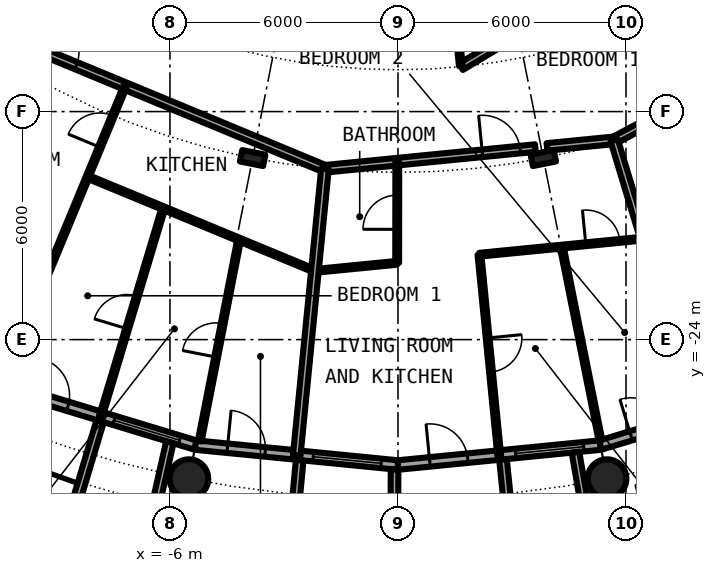
"""IFC4 building model, lengths in metres.
Left out: names, types, materials, properties, quantities, classifications, styles, units other than length and angle.
Written with IfcOpenShell. Run it as: python <this file> out.ifc"""

import sys

from ifc_helpers import new_model, si_unit, direction, frame, frame_2d, origin, origin_2d, place, context, subcontext, project, spatial, rectangle, hollow_circle, i_section, extrude, element, fill, save


model = new_model("IFC4")
c1 = context("Model", 3, precision=1e-05, world=origin(), true_north=direction((0.0, 1.0)))
c2 = subcontext(c1, "Body", "Model", "MODEL_VIEW")
j1 = project(units=[si_unit("LENGTHUNIT", "METRE"), si_unit("PLANEANGLEUNIT", "RADIAN")], contexts=[c1])
p1 = place(None, origin())
s1 = spatial("IfcSite", under=j1, at=p1, CompositionType="ELEMENT")
p2 = place(p1, origin())
s2 = spatial("IfcBuilding", under=s1, at=p2, CompositionType="ELEMENT")
p3 = place(p2, frame((0.0, 0.0, 50.25)))
s3 = spatial("IfcBuildingStorey", under=s2, at=p3, CompositionType="ELEMENT", Elevation=50.25)
for number, where, z_axis, x_axis in (
    (1, (-5.501, -27.658, 0.0), (0.0, 0.0, 1.0), (1.0, 0.0, 0.0)),
    (2, (5.501, -27.658, 0.0), (0.0, 0.0, 1.0), (1.0, 0.0, 0.0)),
):
    element("IfcColumn", number, at=place(p3, frame(where, z_axis=z_axis, x_axis=x_axis)), inside=s3, PredefinedType="COLUMN", context=c2, shape_type="SweptSolid", body=[
        extrude(hollow_circle(Radius=0.508, WallThickness=0.05, at=origin_2d()), origin(), (0.0, 0.0, 1.0), 3.05),
    ])
for number, where, z_axis, x_axis in (
    (3, (-3.824, -19.223, 0.0), (0.0, 0.0, 1.0), (-0.195, -0.981, 0.0)),
    (4, (3.824, -19.223, 0.0), (0.0, 0.0, 1.0), (0.195, -0.981, 0.0)),
):
    element("IfcColumn", number, at=place(p3, frame(where, z_axis=z_axis, x_axis=x_axis)), inside=s3, PredefinedType="COLUMN", context=c2, shape_type="SweptSolid", body=[
        extrude(i_section(OverallWidth=0.305, OverallDepth=0.62, WebThickness=0.021, FlangeThickness=0.04, FilletRadius=0.027, at=origin_2d()), origin(), (0.0, 0.0, 1.0), 3.05),
    ])
p4 = place(p3, frame((-10.447, -25.222, 0.0), z_axis=(0.0, 0.0, 1.0), x_axis=(0.956965678721, -0.290201119486, 0.0)))
e5 = element("IfcWall", 5, at=p4, inside=s3, PredefinedType="SOLIDWALL", context=c2, shape_type="SweptSolid", body=[
    extrude(rectangle(XDim=5.351, YDim=0.25, at=frame_2d((2.676, 0.0))), origin(), (0.0, 0.0, 1.0), 2.7),
])
p5 = place(p4, frame((0.841, 0.0, 0.0)))
e6 = element("IfcOpeningElement", 6, at=p5, cuts=e5, PredefinedType="OPENING", context=c2, shape_type="SweptSolid", body=[
    extrude(rectangle(XDim=1.0, YDim=2.2, at=frame_2d((0.5, 1.1))), frame((0.0, 0.135, 0.0), z_axis=(0.0, -1.0, 0.0), x_axis=(1.0, 0.0, 0.0)), (0.0, 0.0, 1.0), 0.27),
])
p6 = place(p4, frame((3.111, 0.0, 0.3)))
e7 = element("IfcOpeningElement", 7, at=p6, cuts=e5, PredefinedType="OPENING", context=c2, shape_type="SweptSolid", body=[
    extrude(rectangle(XDim=1.8, YDim=2.1, at=frame_2d((0.9, 1.05))), frame((0.0, 0.135, 0.0), z_axis=(0.0, -1.0, 0.0), x_axis=(1.0, 0.0, 0.0)), (0.0, 0.0, 1.0), 0.27),
])
p7 = place(p3, frame((-7.837, -26.144, -0.03), z_axis=(0.0, 0.0, 1.0), x_axis=(-0.287064767992, -0.957911174889, 0.0)))
e8 = element("IfcWall", 8, at=p7, inside=s3, PredefinedType="SOLIDWALL", context=c2, shape_type="SweptSolid", body=[
    extrude(rectangle(XDim=3.006, YDim=0.2, at=frame_2d((1.503, 0.0))), origin(), (0.0, 0.0, 1.0), 2.73),
])
p8 = place(p3, frame((-6.004, -26.7, -0.03), z_axis=(0.0, 0.0, 1.0), x_axis=(-0.219609259383, -0.975587911566, 0.0)))
e9 = element("IfcWall", 9, at=p8, inside=s3, PredefinedType="SOLIDWALL", context=c2, shape_type="SweptSolid", body=[
    extrude(rectangle(XDim=2.933, YDim=0.2, at=frame_2d((1.466, 0.0))), origin(), (0.0, 0.0, 1.0), 2.73),
])
p9 = place(p3, frame((-5.326, -26.775, 0.0), z_axis=(0.0, 0.0, 1.0), x_axis=(0.995173996315, -0.098126026407, 0.0)))
e10 = element("IfcWall", 10, at=p9, inside=s3, PredefinedType="SOLIDWALL", context=c2, shape_type="SweptSolid", body=[
    extrude(rectangle(XDim=5.352, YDim=0.25, at=frame_2d((2.676, 0.0))), origin(), (0.0, 0.0, 1.0), 2.7),
])
p10 = place(p9, frame((0.841, 0.0, 0.0)))
e11 = element("IfcOpeningElement", 11, at=p10, cuts=e10, PredefinedType="OPENING", context=c2, shape_type="SweptSolid", body=[
    extrude(rectangle(XDim=1.0, YDim=2.2, at=frame_2d((0.5, 1.1))), frame((0.0, 0.135, 0.0), z_axis=(0.0, -1.0, 0.0), x_axis=(1.0, 0.0, 0.0)), (0.0, 0.0, 1.0), 0.27),
])
p11 = place(p9, frame((3.111, 0.0, 0.3)))
e12 = element("IfcOpeningElement", 12, at=p11, cuts=e10, PredefinedType="OPENING", context=c2, shape_type="SweptSolid", body=[
    extrude(rectangle(XDim=1.8, YDim=2.1, at=frame_2d((0.9, 1.05))), frame((0.0, 0.135, 0.0), z_axis=(0.0, -1.0, 0.0), x_axis=(1.0, 0.0, 0.0)), (0.0, 0.0, 1.0), 0.27),
])
p12 = place(p3, frame((-2.586, -27.171, -0.03), z_axis=(0.0, 0.0, 1.0), x_axis=(-0.094548432284, -0.995520262954, 0.0)))
e13 = element("IfcWall", 13, at=p12, inside=s3, PredefinedType="SOLIDWALL", context=c2, shape_type="SweptSolid", body=[
    extrude(rectangle(XDim=3.006, YDim=0.2, at=frame_2d((1.503, 0.0))), origin(), (0.0, 0.0, 1.0), 2.73),
])
p13 = place(p3, frame((-0.09, -27.417, -0.03), z_axis=(0.0, 0.0, 1.0), x_axis=(-0.00347308367, -0.999993968827, 0.0)))
e14 = element("IfcWall", 14, at=p13, inside=s3, PredefinedType="SOLIDWALL", context=c2, shape_type="SweptSolid", body=[
    extrude(rectangle(XDim=2.882, YDim=0.2, at=frame_2d((1.441, 0.0))), origin(), (0.0, 0.0, 1.0), 2.73),
])
p14 = place(p3, frame((0.0, -27.3, 0.0), z_axis=(0.0, 0.0, 1.0), x_axis=(0.995173996315, 0.098126026407, 0.0)))
e15 = element("IfcWall", 15, at=p14, inside=s3, PredefinedType="SOLIDWALL", context=c2, shape_type="SweptSolid", body=[
    extrude(rectangle(XDim=5.352, YDim=0.25, at=frame_2d((2.676, 0.0))), origin(), (0.0, 0.0, 1.0), 2.7),
])
p15 = place(p14, frame((0.841, 0.0, 0.0)))
e16 = element("IfcOpeningElement", 16, at=p15, cuts=e15, PredefinedType="OPENING", context=c2, shape_type="SweptSolid", body=[
    extrude(rectangle(XDim=1.0, YDim=2.2, at=frame_2d((0.5, 1.1))), frame((0.0, 0.135, 0.0), z_axis=(0.0, -1.0, 0.0), x_axis=(1.0, 0.0, 0.0)), (0.0, 0.0, 1.0), 0.27),
])
p16 = place(p14, frame((3.111, 0.0, 0.3)))
e17 = element("IfcOpeningElement", 17, at=p16, cuts=e15, PredefinedType="OPENING", context=c2, shape_type="SweptSolid", body=[
    extrude(rectangle(XDim=1.8, YDim=2.1, at=frame_2d((0.9, 1.05))), frame((0.0, 0.135, 0.0), z_axis=(0.0, -1.0, 0.0), x_axis=(1.0, 0.0, 0.0)), (0.0, 0.0, 1.0), 0.27),
])
p17 = place(p3, frame((2.764, -27.153, -0.03), z_axis=(0.0, 0.0, 1.0), x_axis=(0.101505487237, -0.994834979311, 0.0)))
e18 = element("IfcWall", 18, at=p17, inside=s3, PredefinedType="SOLIDWALL", context=c2, shape_type="SweptSolid", body=[
    extrude(rectangle(XDim=3.007, YDim=0.2, at=frame_2d((1.503, 0.0))), origin(), (0.0, 0.0, 1.0), 2.73),
])
p18 = place(p3, frame((4.671, -26.966, -0.03), z_axis=(0.0, 0.0, 1.0), x_axis=(0.170539878907, -0.985350774954, 0.0)))
e19 = element("IfcWall", 19, at=p18, inside=s3, PredefinedType="SOLIDWALL", context=c2, shape_type="SweptSolid", body=[
    extrude(rectangle(XDim=2.932, YDim=0.2, at=frame_2d((1.466, 0.0))), origin(), (0.0, 0.0, 1.0), 2.73),
])
p19 = place(p3, frame((5.326, -26.775, 0.0), z_axis=(0.0, 0.0, 1.0), x_axis=(0.956965678721, 0.290201119486, 0.0)))
e20 = element("IfcWall", 20, at=p19, inside=s3, PredefinedType="SOLIDWALL", context=c2, shape_type="SweptSolid", body=[
    extrude(rectangle(XDim=5.351, YDim=0.25, at=frame_2d((2.676, 0.0))), origin(), (0.0, 0.0, 1.0), 2.7),
])
p20 = place(p19, frame((0.841, 0.0, 0.0)))
e21 = element("IfcOpeningElement", 21, at=p20, cuts=e20, PredefinedType="OPENING", context=c2, shape_type="SweptSolid", body=[
    extrude(rectangle(XDim=1.0, YDim=2.2, at=frame_2d((0.5, 1.1))), frame((0.0, 0.135, 0.0), z_axis=(0.0, -1.0, 0.0), x_axis=(1.0, 0.0, 0.0)), (0.0, 0.0, 1.0), 0.27),
])
p21 = place(p19, frame((3.111, 0.0, 0.3)))
e22 = element("IfcOpeningElement", 22, at=p21, cuts=e20, PredefinedType="OPENING", context=c2, shape_type="SweptSolid", body=[
    extrude(rectangle(XDim=1.8, YDim=2.1, at=frame_2d((0.9, 1.05))), frame((0.0, 0.135, 0.0), z_axis=(0.0, -1.0, 0.0), x_axis=(1.0, 0.0, 0.0)), (0.0, 0.0, 1.0), 0.27),
])
p22 = place(p3, frame((-2.196, -22.193, 0.0), z_axis=(0.0, 0.0, 1.0), x_axis=(0.995193648169, 0.097926516552, 0.0)))
e23 = element("IfcWall", 23, at=p22, inside=s3, PredefinedType="PARTITIONING", context=c2, shape_type="SweptSolid", body=[
    extrude(rectangle(XDim=2.177, YDim=0.1, at=frame_2d((1.088, 0.0))), origin(), (0.0, 0.0, 1.0), 2.7),
])
p23 = place(p3, frame((2.144, -21.766, 0.0), z_axis=(0.0, 0.0, 1.0), x_axis=(0.995192120883, 0.097942036599, 0.0)))
e24 = element("IfcWall", 24, at=p23, inside=s3, PredefinedType="PARTITIONING", context=c2, shape_type="SweptSolid", body=[
    extrude(rectangle(XDim=4.35, YDim=0.1, at=frame_2d((2.175, 0.0))), origin(), (0.0, 0.0, 1.0), 2.7),
])
p24 = place(p23, frame((2.812, 0.0, 0.0)))
e25 = element("IfcOpeningElement", 25, at=p24, cuts=e24, PredefinedType="OPENING", context=c2, shape_type="SweptSolid", body=[
    extrude(rectangle(XDim=0.9, YDim=2.3, at=frame_2d((0.45, 1.15))), frame((0.0, 0.06, 0.0), z_axis=(0.0, -1.0, 0.0), x_axis=(1.0, 0.0, 0.0)), (0.0, 0.0, 1.0), 0.12),
])
p25 = place(p3, frame((-8.164, -19.716, 0.0), z_axis=(0.0, 0.0, 1.0), x_axis=(0.92387253274, -0.38270033087, 0.0)))
e26 = element("IfcWall", 26, at=p25, inside=s3, PredefinedType="PARTITIONING", context=c2, shape_type="SweptSolid", body=[
    extrude(rectangle(XDim=6.475, YDim=0.1, at=frame_2d((3.238, 0.0))), origin(), (0.0, 0.0, 1.0), 2.7),
])
p26 = place(p3, frame((-1.927, -19.506, 0.0), z_axis=(0.0, 0.0, 1.0), x_axis=(0.995181086618, 0.098054091383, 0.0)))
e27 = element("IfcWall", 27, at=p26, inside=s3, PredefinedType="PARTITIONING", context=c2, shape_type="SweptSolid", body=[
    extrude(rectangle(XDim=5.57, YDim=0.2, at=frame_2d((2.785, 0.0))), origin(), (0.0, 0.0, 1.0), 2.38),
])
p27 = place(p26, frame((4.168, 0.0, 0.0)))
e28 = element("IfcOpeningElement", 28, at=p27, cuts=e27, PredefinedType="OPENING", context=c2, shape_type="SweptSolid", body=[
    extrude(rectangle(XDim=1.0, YDim=2.3, at=frame_2d((0.5, 1.15))), frame((0.0, 0.11, 0.0), z_axis=(0.0, -1.0, 0.0), x_axis=(1.0, 0.0, 0.0)), (0.0, 0.0, 1.0), 0.22),
])
p28 = place(p3, frame((3.921, -18.93, 0.0), z_axis=(0.0, 0.0, 1.0), x_axis=(0.995207057161, 0.097790149696, 0.0)))
e29 = element("IfcWall", 29, at=p28, inside=s3, PredefinedType="PARTITIONING", context=c2, shape_type="SweptSolid", body=[
    extrude(rectangle(XDim=1.778, YDim=0.2, at=frame_2d((0.889, 0.0))), origin(), (0.0, 0.0, 1.0), 2.38),
])
p29 = place(p3, frame((5.69, -18.756, 0.0), z_axis=(0.0, 0.0, 1.0), x_axis=(0.881866548297, 0.471499089072, 0.0)))
e30 = element("IfcWall", 30, at=p29, inside=s3, PredefinedType="PARTITIONING", context=c2, shape_type="SweptSolid", body=[
    extrude(rectangle(XDim=5.563, YDim=0.2, at=frame_2d((2.782, 0.0))), origin(), (0.0, 0.0, 1.0), 2.38),
])
p30 = place(p29, frame((2.368, 0.0, 0.0)))
e31 = element("IfcOpeningElement", 31, at=p30, cuts=e30, PredefinedType="OPENING", context=c2, shape_type="SweptSolid", body=[
    extrude(rectangle(XDim=1.0, YDim=2.3, at=frame_2d((0.5, 1.15))), frame((0.0, 0.11, 0.0), z_axis=(0.0, -1.0, 0.0), x_axis=(1.0, 0.0, 0.0)), (0.0, 0.0, 1.0), 0.22),
])
p31 = place(p3, frame((-12.434, -15.151, 0.0), z_axis=(0.0, 0.0, 1.0), x_axis=(0.923888467236, -0.382661861319, 0.0)))
e32 = element("IfcWall", 32, at=p31, inside=s3, PredefinedType="PARTITIONING", context=c2, shape_type="SweptSolid", body=[
    extrude(rectangle(XDim=11.381, YDim=0.2, at=frame_2d((5.691, 0.0))), origin(), (0.0, 0.0, 1.0), 2.7),
])
p32 = place(p31, frame((3.292, 0.0, 0.0)))
e33 = element("IfcOpeningElement", 33, at=p32, cuts=e32, PredefinedType="OPENING", context=c2, shape_type="SweptSolid", body=[
    extrude(rectangle(XDim=1.0, YDim=2.3, at=frame_2d((0.5, 1.15))), frame((0.0, 0.11, 0.0), z_axis=(0.0, -1.0, 0.0), x_axis=(1.0, 0.0, 0.0)), (0.0, 0.0, 1.0), 0.22),
])
p33 = place(p3, frame((1.656, -16.819, 0.0), z_axis=(0.0, 0.0, 1.0), x_axis=(0.857773470126, 0.514027892189, 0.0)))
e34 = element("IfcWall", 34, at=p33, inside=s3, PredefinedType="PARTITIONING", context=c2, shape_type="SweptSolid", body=[
    extrude(rectangle(XDim=14.429, YDim=0.2, at=frame_2d((7.215, 0.0))), origin(), (0.0, 0.0, 1.0), 2.7),
])
p34 = place(p33, frame((4.318, 0.0, 0.0)))
e35 = element("IfcOpeningElement", 35, at=p34, cuts=e34, PredefinedType="OPENING", context=c2, shape_type="SweptSolid", body=[
    extrude(rectangle(XDim=1.0, YDim=2.3, at=frame_2d((0.5, 1.15))), frame((0.0, 0.11, 0.0), z_axis=(0.0, -1.0, 0.0), x_axis=(1.0, 0.0, 0.0)), (0.0, 0.0, 1.0), 0.22),
])
p35 = place(p3, frame((-10.399, -25.106, 0.0), z_axis=(0.0, 0.0, 1.0), x_axis=(0.382697543868, 0.923873687209, 0.0)))
e36 = element("IfcWall", 36, at=p35, inside=s3, PredefinedType="PARTITIONING", context=c2, shape_type="SweptSolid", body=[
    extrude(rectangle(XDim=8.419, YDim=0.1, at=frame_2d((4.209, 0.0))), origin(), (0.0, 0.0, 1.0), 2.7),
])
p36 = place(p35, frame((6.677, 0.0, 0.0)))
e37 = element("IfcOpeningElement", 37, at=p36, cuts=e36, PredefinedType="OPENING", context=c2, shape_type="SweptSolid", body=[
    extrude(rectangle(XDim=0.9, YDim=2.3, at=frame_2d((0.45, 1.15))), frame((0.0, 0.06, 0.0), z_axis=(0.0, -1.0, 0.0), x_axis=(1.0, 0.0, 0.0)), (0.0, 0.0, 1.0), 0.12),
])
p37 = place(p35, frame((2.468, 0.0, 0.0)))
e38 = element("IfcOpeningElement", 38, at=p37, cuts=e36, PredefinedType="OPENING", context=c2, shape_type="SweptSolid", body=[
    extrude(rectangle(XDim=0.9, YDim=2.3, at=frame_2d((0.45, 1.15))), frame((0.0, 0.06, 0.0), z_axis=(0.0, -1.0, 0.0), x_axis=(1.0, 0.0, 0.0)), (0.0, 0.0, 1.0), 0.12),
])
p38 = place(p3, frame((-7.821, -26.025, 0.0), z_axis=(0.0, 0.0, 1.0), x_axis=(0.287793773423, 0.957692405723, 0.0)))
e39 = element("IfcWall", 39, at=p38, inside=s3, PredefinedType="PARTITIONING", context=c2, shape_type="SweptSolid", body=[
    extrude(rectangle(XDim=5.726, YDim=0.1, at=frame_2d((2.863, 0.0))), origin(), (0.0, 0.0, 1.0), 2.7),
])
p39 = place(p38, frame((2.413, 0.0, 0.0)))
e40 = element("IfcOpeningElement", 40, at=p39, cuts=e39, PredefinedType="OPENING", context=c2, shape_type="SweptSolid", body=[
    extrude(rectangle(XDim=0.9, YDim=2.3, at=frame_2d((0.45, 1.15))), frame((0.0, 0.06, 0.0), z_axis=(0.0, -1.0, 0.0), x_axis=(1.0, 0.0, 0.0)), (0.0, 0.0, 1.0), 0.12),
])
p40 = place(p3, frame((-5.217, -26.67, 0.0), z_axis=(0.0, 0.0, 1.0), x_axis=(0.192109041462, 0.981373586453, 0.0)))
e41 = element("IfcWall", 41, at=p40, inside=s3, PredefinedType="PARTITIONING", context=c2, shape_type="SweptSolid", body=[
    extrude(rectangle(XDim=5.404, YDim=0.1, at=frame_2d((2.702, 0.0))), origin(), (0.0, 0.0, 1.0), 2.7),
])
p41 = place(p40, frame((2.252, 0.0, 0.0)))
e42 = element("IfcOpeningElement", 42, at=p41, cuts=e41, PredefinedType="OPENING", context=c2, shape_type="SweptSolid", body=[
    extrude(rectangle(XDim=0.9, YDim=2.3, at=frame_2d((0.45, 1.15))), frame((0.0, 0.06, 0.0), z_axis=(0.0, -1.0, 0.0), x_axis=(1.0, 0.0, 0.0)), (0.0, 0.0, 1.0), 0.12),
])
p42 = place(p3, frame((-2.664, -27.044, 0.0), z_axis=(0.0, 0.0, 1.0), x_axis=(0.098115395479, 0.995175044487, 0.0)))
e43 = element("IfcWall", 43, at=p42, inside=s3, PredefinedType="PARTITIONING", context=c2, shape_type="SweptSolid", body=[
    extrude(rectangle(XDim=7.574, YDim=0.2, at=frame_2d((3.787, 0.0))), origin(), (0.0, 0.0, 1.0), 2.7),
])
p43 = place(p3, frame((-0.021, -21.979, 0.0), z_axis=(0.0, 0.0, 1.0), x_axis=(0.001101017775, 0.99999939388, 0.0)))
e44 = element("IfcWall", 44, at=p43, inside=s3, PredefinedType="PARTITIONING", context=c2, shape_type="SweptSolid", body=[
    extrude(rectangle(XDim=2.661, YDim=0.1, at=frame_2d((1.331, 0.0))), origin(), (0.0, 0.0, 1.0), 2.7),
])
p44 = place(p43, frame((0.881, 0.0, 0.0)))
e45 = element("IfcOpeningElement", 45, at=p44, cuts=e44, PredefinedType="OPENING", context=c2, shape_type="SweptSolid", body=[
    extrude(rectangle(XDim=0.9, YDim=2.3, at=frame_2d((0.45, 1.15))), frame((0.0, 0.06, 0.0), z_axis=(0.0, -1.0, 0.0), x_axis=(1.0, 0.0, 0.0)), (0.0, 0.0, 1.0), 0.12),
])
p45 = place(p3, frame((2.144, -21.766, 0.0), z_axis=(0.0, 0.0, 1.0), x_axis=(0.098054199821, -0.995181075934, 0.0)))
e46 = element("IfcWall", 46, at=p45, inside=s3, PredefinedType="PARTITIONING", context=c2, shape_type="SweptSolid", body=[
    extrude(rectangle(XDim=5.303, YDim=0.1, at=frame_2d((2.652, 0.0))), origin(), (0.0, 0.0, 1.0), 2.7),
])
p46 = place(p45, frame((2.202, 0.0, 0.0)))
e47 = element("IfcOpeningElement", 47, at=p46, cuts=e46, PredefinedType="OPENING", context=c2, shape_type="SweptSolid", body=[
    extrude(rectangle(XDim=0.9, YDim=2.3, at=frame_2d((0.45, 1.15))), frame((0.0, 0.06, 0.0), z_axis=(0.0, -1.0, 0.0), x_axis=(1.0, 0.0, 0.0)), (0.0, 0.0, 1.0), 0.12),
])
p47 = place(p3, frame((4.309, -21.553, 0.0), z_axis=(0.0, 0.0, 1.0), x_axis=(0.195899255693, -0.980624026638, 0.0)))
e48 = element("IfcWall", 48, at=p47, inside=s3, PredefinedType="PARTITIONING", context=c2, shape_type="SweptSolid", body=[
    extrude(rectangle(XDim=5.196, YDim=0.1, at=frame_2d((2.598, 0.0))), origin(), (0.0, 0.0, 1.0), 2.7),
])
p48 = place(p3, frame((5.689, -18.756, 0.0), z_axis=(0.0, 0.0, 1.0), x_axis=(0.290294523619, -0.956937348815, 0.0)))
e49 = element("IfcWall", 49, at=p48, inside=s3, PredefinedType="PARTITIONING", context=c2, shape_type="SweptSolid", body=[
    extrude(rectangle(XDim=7.575, YDim=0.2, at=frame_2d((3.788, 0.0))), origin(), (0.0, 0.0, 1.0), 2.7),
])
p49 = place(p3, frame((1.654, -16.797, 0.0), z_axis=(0.0, 0.0, 1.0), x_axis=(-0.097901702875, 0.995196089509, 0.0)))
e50 = element("IfcWall", 50, at=p49, inside=s3, PredefinedType="PARTITIONING", context=c2, shape_type="SweptSolid", body=[
    extrude(rectangle(XDim=2.656, YDim=0.1, at=frame_2d((1.328, 0.0))), origin(), (0.0, 0.0, 1.0), 2.7),
])
p50 = place(p5, origin())
e51 = element("IfcDoor", 51, at=p50, inside=s3, OperationType="SINGLE_SWING_LEFT", PredefinedType="DOOR", context=c2, shape_type="SweptSolid", body=[
    extrude(rectangle(XDim=1.0, YDim=2.2, at=frame_2d((0.5, 1.1))), frame((0.0, 0.025, 0.0), z_axis=(0.0, -1.0, 0.0), x_axis=(1.0, 0.0, 0.0)), (0.0, 0.0, 1.0), 0.05),
])
fill(e6, e51)
p51 = place(p6, origin())
e52 = element("IfcWindow", 52, at=p51, inside=s3, PartitioningType="SINGLE_PANEL", PredefinedType="WINDOW", context=c2, shape_type="SweptSolid", body=[
    extrude(rectangle(XDim=1.8, YDim=2.1, at=frame_2d((0.9, 1.05))), frame((0.0, 0.03, 0.0), z_axis=(0.0, -1.0, 0.0), x_axis=(1.0, 0.0, 0.0)), (0.0, 0.0, 1.0), 0.06),
])
fill(e7, e52)
p52 = place(p10, origin())
e53 = element("IfcDoor", 53, at=p52, inside=s3, OperationType="SINGLE_SWING_LEFT", PredefinedType="DOOR", context=c2, shape_type="SweptSolid", body=[
    extrude(rectangle(XDim=1.0, YDim=2.2, at=frame_2d((0.5, 1.1))), frame((0.0, 0.025, 0.0), z_axis=(0.0, -1.0, 0.0), x_axis=(1.0, 0.0, 0.0)), (0.0, 0.0, 1.0), 0.05),
])
fill(e11, e53)
p53 = place(p11, origin())
e54 = element("IfcWindow", 54, at=p53, inside=s3, PartitioningType="SINGLE_PANEL", PredefinedType="WINDOW", context=c2, shape_type="SweptSolid", body=[
    extrude(rectangle(XDim=1.8, YDim=2.1, at=frame_2d((0.9, 1.05))), frame((0.0, 0.03, 0.0), z_axis=(0.0, -1.0, 0.0), x_axis=(1.0, 0.0, 0.0)), (0.0, 0.0, 1.0), 0.06),
])
fill(e12, e54)
p54 = place(p15, origin())
e55 = element("IfcDoor", 55, at=p54, inside=s3, OperationType="SINGLE_SWING_LEFT", PredefinedType="DOOR", context=c2, shape_type="SweptSolid", body=[
    extrude(rectangle(XDim=1.0, YDim=2.2, at=frame_2d((0.5, 1.1))), frame((0.0, 0.025, 0.0), z_axis=(0.0, -1.0, 0.0), x_axis=(1.0, 0.0, 0.0)), (0.0, 0.0, 1.0), 0.05),
])
fill(e16, e55)
p55 = place(p16, origin())
e56 = element("IfcWindow", 56, at=p55, inside=s3, PartitioningType="SINGLE_PANEL", PredefinedType="WINDOW", context=c2, shape_type="SweptSolid", body=[
    extrude(rectangle(XDim=1.8, YDim=2.1, at=frame_2d((0.9, 1.05))), frame((0.0, 0.03, 0.0), z_axis=(0.0, -1.0, 0.0), x_axis=(1.0, 0.0, 0.0)), (0.0, 0.0, 1.0), 0.06),
])
fill(e17, e56)
p56 = place(p20, origin())
e57 = element("IfcDoor", 57, at=p56, inside=s3, OperationType="SINGLE_SWING_LEFT", PredefinedType="DOOR", context=c2, shape_type="SweptSolid", body=[
    extrude(rectangle(XDim=1.0, YDim=2.2, at=frame_2d((0.5, 1.1))), frame((0.0, 0.025, 0.0), z_axis=(0.0, -1.0, 0.0), x_axis=(1.0, 0.0, 0.0)), (0.0, 0.0, 1.0), 0.05),
])
fill(e21, e57)
p57 = place(p32, origin())
e58 = element("IfcDoor", 58, at=p57, inside=s3, OperationType="SINGLE_SWING_LEFT", PredefinedType="DOOR", context=c2, shape_type="SweptSolid", body=[
    extrude(rectangle(XDim=1.0, YDim=2.3, at=frame_2d((0.5, 1.15))), frame((0.0, 0.025, 0.0), z_axis=(0.0, -1.0, 0.0), x_axis=(1.0, 0.0, 0.0)), (0.0, 0.0, 1.0), 0.05),
])
fill(e33, e58)
p58 = place(p36, origin())
e59 = element("IfcDoor", 59, at=p58, inside=s3, OperationType="SINGLE_SWING_RIGHT", PredefinedType="DOOR", context=c2, shape_type="SweptSolid", body=[
    extrude(rectangle(XDim=0.9, YDim=2.3, at=frame_2d((0.45, 1.15))), frame((0.0, 0.025, 0.0), z_axis=(0.0, -1.0, 0.0), x_axis=(1.0, 0.0, 0.0)), (0.0, 0.0, 1.0), 0.05),
])
fill(e37, e59)
p59 = place(p37, origin())
e60 = element("IfcDoor", 60, at=p59, inside=s3, OperationType="SINGLE_SWING_LEFT", PredefinedType="DOOR", context=c2, shape_type="SweptSolid", body=[
    extrude(rectangle(XDim=0.9, YDim=2.3, at=frame_2d((0.45, 1.15))), frame((0.0, 0.025, 0.0), z_axis=(0.0, -1.0, 0.0), x_axis=(1.0, 0.0, 0.0)), (0.0, 0.0, 1.0), 0.05),
])
fill(e38, e60)
p60 = place(p39, origin())
e61 = element("IfcDoor", 61, at=p60, inside=s3, OperationType="SINGLE_SWING_LEFT", PredefinedType="DOOR", context=c2, shape_type="SweptSolid", body=[
    extrude(rectangle(XDim=0.9, YDim=2.3, at=frame_2d((0.45, 1.15))), frame((0.0, 0.025, 0.0), z_axis=(0.0, -1.0, 0.0), x_axis=(1.0, 0.0, 0.0)), (0.0, 0.0, 1.0), 0.05),
])
fill(e40, e61)
p61 = place(p41, origin())
e62 = element("IfcDoor", 62, at=p61, inside=s3, OperationType="SINGLE_SWING_RIGHT", PredefinedType="DOOR", context=c2, shape_type="SweptSolid", body=[
    extrude(rectangle(XDim=0.9, YDim=2.3, at=frame_2d((0.45, 1.15))), frame((0.0, 0.025, 0.0), z_axis=(0.0, -1.0, 0.0), x_axis=(1.0, 0.0, 0.0)), (0.0, 0.0, 1.0), 0.05),
])
fill(e42, e62)
p62 = place(p27, origin())
e63 = element("IfcDoor", 63, at=p62, inside=s3, OperationType="SINGLE_SWING_RIGHT", PredefinedType="DOOR", context=c2, shape_type="SweptSolid", body=[
    extrude(rectangle(XDim=1.0, YDim=2.3, at=frame_2d((0.5, 1.15))), frame((0.0, 0.025, 0.0), z_axis=(0.0, -1.0, 0.0), x_axis=(1.0, 0.0, 0.0)), (0.0, 0.0, 1.0), 0.05),
])
fill(e28, e63)
p63 = place(p44, origin())
e64 = element("IfcDoor", 64, at=p63, inside=s3, OperationType="SINGLE_SWING_RIGHT", PredefinedType="DOOR", context=c2, shape_type="SweptSolid", body=[
    extrude(rectangle(XDim=0.9, YDim=2.3, at=frame_2d((0.45, 1.15))), frame((0.0, 0.025, 0.0), z_axis=(0.0, -1.0, 0.0), x_axis=(1.0, 0.0, 0.0)), (0.0, 0.0, 1.0), 0.05),
])
fill(e45, e64)
p64 = place(p46, origin())
e65 = element("IfcDoor", 65, at=p64, inside=s3, OperationType="SINGLE_SWING_LEFT", PredefinedType="DOOR", context=c2, shape_type="SweptSolid", body=[
    extrude(rectangle(XDim=0.9, YDim=2.3, at=frame_2d((0.45, 1.15))), frame((0.0, 0.025, 0.0), z_axis=(0.0, -1.0, 0.0), x_axis=(1.0, 0.0, 0.0)), (0.0, 0.0, 1.0), 0.05),
])
fill(e47, e65)
p65 = place(p24, origin())
e66 = element("IfcDoor", 66, at=p65, inside=s3, OperationType="SINGLE_SWING_RIGHT", PredefinedType="DOOR", context=c2, shape_type="SweptSolid", body=[
    extrude(rectangle(XDim=0.9, YDim=2.3, at=frame_2d((0.45, 1.15))), frame((0.0, 0.025, 0.0), z_axis=(0.0, -1.0, 0.0), x_axis=(1.0, 0.0, 0.0)), (0.0, 0.0, 1.0), 0.05),
])
fill(e25, e66)
save(model, sys.argv[1])
